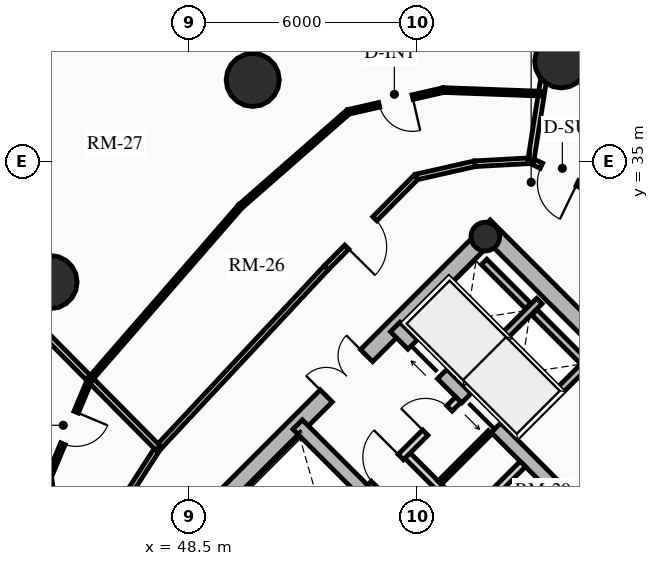
"""IFC4 building model, lengths in metres.
Left out: names, types, materials, properties, quantities, classifications, styles, units other than length and angle.
Written with IfcOpenShell. Run it as: python <this file> out.ifc"""

import sys

from ifc_helpers import new_model, si_unit, direction, frame, frame_2d, origin, origin_2d, place, context, subcontext, project, spatial, rectangle, circle, hollow_circle, extrude, source, transform, mapped, element, fill, save


model = new_model("IFC4")
c1 = context("Model", 3, precision=1e-05, world=origin(), true_north=direction((0.0, 1.0)))
c2 = subcontext(c1, "Body", "Model", "MODEL_VIEW")
j1 = project(units=[si_unit("LENGTHUNIT", "METRE"), si_unit("PLANEANGLEUNIT", "RADIAN")], contexts=[c1])
p1 = place(None, origin())
s1 = spatial("IfcSite", under=j1, at=p1, CompositionType="ELEMENT")
p2 = place(p1, origin())
s2 = spatial("IfcBuilding", under=s1, at=p2, CompositionType="ELEMENT")
p3 = place(p2, frame((0.0, 0.0, 93.43)))
s3 = spatial("IfcBuildingStorey", under=s2, at=p3, CompositionType="ELEMENT", Elevation=93.43)
p4 = place(p3, frame((66.303, 23.263, 0.0), z_axis=(0.0, 0.0, 1.0), x_axis=(-0.707106781187, 0.707106781187, 0.0)))
e1 = element("IfcWall", 1, at=p4, inside=s3, PredefinedType="SHEAR", context=c2, shape_type="SweptSolid", body=[
    extrude(rectangle(XDim=14.2, YDim=0.45, at=frame_2d((7.1, 0.0))), origin(), (0.0, 0.0, 1.0), 2.91),
])
p5 = place(p3, frame((48.856, 25.578, 0.0), z_axis=(0.0, 0.0, 1.0), x_axis=(0.707106781187, 0.707106781187, 0.0)))
e2 = element("IfcWall", 2, at=p5, inside=s3, PredefinedType="SHEAR", context=c2, shape_type="SweptSolid", body=[
    extrude(rectangle(XDim=10.7, YDim=0.45, at=frame_2d((5.35, 0.0))), origin(), (0.0, 0.0, 1.0), 2.91),
])
m1 = source(origin(), c2, "Body", "SweptSolid", [
    extrude(rectangle(XDim=1.5, YDim=2.02, at=frame_2d((0.75, 1.01))), frame((0.0, 0.235, 0.0), z_axis=(0.0, -1.0, 0.0), x_axis=(1.0, 0.0, 0.0)), (0.0, 0.0, 1.0), 0.47),
])
p6 = place(p5, frame((4.6, 0.0, 0.0)))
e3 = element("IfcOpeningElement", 3, at=p6, cuts=e2, PredefinedType="OPENING", context=c2, shape_type="MappedRepresentation", body=[
    mapped(m1, transform((0.0, 0.0, 0.0), x_axis=(1.0, 0.0, 0.0), y_axis=(0.0, 1.0, 0.0), z_axis=(0.0, 0.0, 1.0), scale=1.0)),
])
p7 = place(p3, frame((61.078, 18.355, 0.0), z_axis=(0.0, 0.0, 1.0), x_axis=(-0.707106781187, 0.707106781187, 0.0)))
e4 = element("IfcWall", 4, at=p7, inside=s3, PredefinedType="SHEAR", context=c2, shape_type="SweptSolid", body=[
    extrude(rectangle(XDim=13.75, YDim=0.35, at=frame_2d((6.875, 0.0))), origin(), (0.0, 0.0, 1.0), 2.91),
])
m2 = source(origin(), c2, "Body", "SweptSolid", [
    extrude(rectangle(XDim=1.1, YDim=2.015, at=frame_2d((0.55, 1.007))), frame((0.0, 0.185, 0.0), z_axis=(0.0, -1.0, 0.0), x_axis=(1.0, 0.0, 0.0)), (0.0, 0.0, 1.0), 0.37),
])
p8 = place(p7, frame((4.875, 0.0, 0.0)))
e5 = element("IfcOpeningElement", 5, at=p8, cuts=e4, PredefinedType="OPENING", context=c2, shape_type="MappedRepresentation", body=[
    mapped(m2, transform((0.0, 0.0, 0.0), x_axis=(1.0, 0.0, 0.0), y_axis=(0.0, 1.0, 0.0), z_axis=(0.0, 0.0, 1.0), scale=1.0)),
])
m3 = source(origin(), c2, "Body", "SweptSolid", [
    extrude(rectangle(XDim=1.15, YDim=2.02, at=frame_2d((0.575, 1.01))), frame((0.0, 0.185, 0.0), z_axis=(0.0, -1.0, 0.0), x_axis=(1.0, 0.0, 0.0)), (0.0, 0.0, 1.0), 0.37),
])
p9 = place(p7, frame((7.295, 0.0, 0.0)))
e6 = element("IfcOpeningElement", 6, at=p9, cuts=e4, PredefinedType="OPENING", context=c2, shape_type="MappedRepresentation", body=[
    mapped(m3, transform((0.0, 0.0, 0.0), x_axis=(1.0, 0.0, 0.0), y_axis=(0.0, 1.0, 0.0), z_axis=(0.0, 0.0, 1.0), scale=1.0)),
])
p10 = place(p3, frame((63.645, 20.922, 0.0), z_axis=(0.0, 0.0, 1.0), x_axis=(-0.707106781187, 0.707106781187, 0.0)))
e7 = element("IfcWall", 7, at=p10, inside=s3, PredefinedType="SHEAR", context=c2, shape_type="SweptSolid", body=[
    extrude(rectangle(XDim=13.75, YDim=0.35, at=frame_2d((6.875, 0.0))), origin(), (0.0, 0.0, 1.0), 2.91),
])
p11 = place(p10, frame((10.0, 0.0, 0.0)))
e8 = element("IfcOpeningElement", 8, at=p11, cuts=e7, PredefinedType="OPENING", context=c2, shape_type="MappedRepresentation", body=[
    mapped(m2, transform((0.0, 0.0, 0.0), x_axis=(1.0, 0.0, 0.0), y_axis=(0.0, 1.0, 0.0), z_axis=(0.0, 0.0, 1.0), scale=1.0)),
])
p12 = place(p10, frame((12.0, 0.0, 0.0)))
e9 = element("IfcOpeningElement", 9, at=p12, cuts=e7, PredefinedType="OPENING", context=c2, shape_type="MappedRepresentation", body=[
    mapped(m2, transform((0.0, 0.0, 0.0), x_axis=(1.0, 0.0, 0.0), y_axis=(0.0, 1.0, 0.0), z_axis=(0.0, 0.0, 1.0), scale=1.0)),
])
p13 = place(p10, frame((5.305, 0.0, 0.0)))
e10 = element("IfcOpeningElement", 10, at=p13, cuts=e7, PredefinedType="OPENING", context=c2, shape_type="MappedRepresentation", body=[
    mapped(m3, transform((0.0, 0.0, 0.0), x_axis=(1.0, 0.0, 0.0), y_axis=(0.0, 1.0, 0.0), z_axis=(0.0, 0.0, 1.0), scale=1.0)),
])
p14 = place(p3, frame((56.294, 33.024, 0.0), z_axis=(0.0, 0.0, 1.0), x_axis=(0.707106781187, 0.707106781187, 0.0)))
e11 = element("IfcColumn", 11, at=p14, inside=s3, PredefinedType="COLUMN", context=c2, shape_type="SweptSolid", body=[
    extrude(hollow_circle(Radius=0.38, WallThickness=0.032, at=origin_2d()), origin(), (0.0, 0.0, 1.0), 2.91),
])
for number, where, z_axis, x_axis in (
    (12, (58.291, 37.635, 0.0), (0.0, 0.0, 1.0), (1.0, 0.0, 0.0)),
    (13, (50.173, 37.146, 0.0), (0.0, 0.0, 1.0), (1.0, 0.0, 0.0)),
    (14, (44.854, 31.827, 0.0), (0.0, 0.0, 1.0), (1.0, 0.0, 0.0)),
):
    element("IfcColumn", number, at=place(p3, frame(where, z_axis=z_axis, x_axis=x_axis)), inside=s3, PredefinedType="USERDEFINED", context=c2, shape_type="SweptSolid", body=[
        extrude(circle(Radius=0.7, at=origin_2d()), origin(), (0.0, 0.0, 1.0), 2.91),
    ])
p15 = place(p3, frame((57.062, 27.781, 0.0), z_axis=(0.0, 0.0, 1.0), x_axis=(0.707106781187, 0.707106781187, 0.0)))
e15 = element("IfcWall", 15, at=p15, inside=s3, PredefinedType="SHEAR", context=c2, shape_type="SweptSolid", body=[
    extrude(rectangle(XDim=2.97, YDim=0.2, at=frame_2d((1.485, 0.0))), origin(), (0.0, 0.0, 1.0), 2.91),
])
p16 = place(p3, frame((55.615, 29.227, 0.0), z_axis=(0.0, 0.0, 1.0), x_axis=(0.707147878904, 0.70706568108, 0.0)))
e16 = element("IfcWall", 16, at=p16, inside=s3, PredefinedType="SHEAR", context=c2, shape_type="SweptSolid", body=[
    extrude(rectangle(XDim=2.97, YDim=0.2, at=frame_2d((1.485, 0.0))), origin(), (0.0, 0.0, 1.0), 2.91),
])
p17 = place(p3, frame((58.865, 29.754, 0.0), z_axis=(0.0, 0.0, 1.0), x_axis=(-0.707174411312, 0.707039144592, 0.0)))
e17 = element("IfcWall", 17, at=p17, inside=s3, PredefinedType="SHEAR", context=c2, shape_type="SweptSolid", body=[
    extrude(rectangle(XDim=1.805, YDim=0.2, at=frame_2d((0.902, 0.0))), origin(), (0.0, 0.0, 1.0), 2.91),
])
p18 = place(p3, frame((57.419, 31.2, 0.0), z_axis=(0.0, 0.0, 1.0), x_axis=(-0.707032117043, 0.707181437447, 0.0)))
e18 = element("IfcWall", 18, at=p18, inside=s3, PredefinedType="SHEAR", context=c2, shape_type="SweptSolid", body=[
    extrude(rectangle(XDim=1.635, YDim=0.2, at=frame_2d((0.817, 0.0))), origin(), (0.0, 0.0, 1.0), 2.91),
])
p19 = place(p3, frame((54.961, 24.719, 0.0), z_axis=(0.0, 0.0, 1.0), x_axis=(0.707106781187, 0.707106781187, 0.0)))
e19 = element("IfcWall", 19, at=p19, inside=s3, PredefinedType="PARTITIONING", context=c2, shape_type="SweptSolid", body=[
    extrude(rectangle(XDim=3.28, YDim=0.2, at=frame_2d((1.64, 0.0))), origin(), (0.0, 0.0, 1.0), 2.655),
])
m4 = source(origin(), c2, "Body", "SweptSolid", [
    extrude(rectangle(XDim=0.9, YDim=2.005, at=frame_2d((0.45, 1.002))), frame((0.0, 0.11, 0.0), z_axis=(0.0, -1.0, 0.0), x_axis=(1.0, 0.0, 0.0)), (0.0, 0.0, 1.0), 0.22),
])
p20 = place(p19, frame((0.16, 0.0, 0.0)))
e20 = element("IfcOpeningElement", 20, at=p20, cuts=e19, PredefinedType="OPENING", context=c2, shape_type="MappedRepresentation", body=[
    mapped(m4, transform((0.0, 0.0, 0.0), x_axis=(1.0, 0.0, 0.0), y_axis=(0.0, 1.0, 0.0), z_axis=(0.0, 0.0, 1.0), scale=1.0)),
])
p21 = place(p3, frame((55.874, 25.631, 0.0), z_axis=(0.0, 0.0, 1.0), x_axis=(-0.707157639372, 0.707055919343, 0.0)))
e21 = element("IfcWall", 21, at=p21, inside=s3, PredefinedType="PARTITIONING", context=c2, shape_type="SweptSolid", body=[
    extrude(rectangle(XDim=2.4, YDim=0.2, at=frame_2d((1.2, 0.0))), origin(), (0.0, 0.0, 1.0), 2.655),
])
p22 = place(p21, frame((0.14, 0.0, 0.0)))
e22 = element("IfcOpeningElement", 22, at=p22, cuts=e21, PredefinedType="OPENING", context=c2, shape_type="MappedRepresentation", body=[
    mapped(m4, transform((0.0, 0.0, 0.0), x_axis=(1.0, 0.0, 0.0), y_axis=(0.0, 1.0, 0.0), z_axis=(0.0, 0.0, 1.0), scale=1.0)),
])
p23 = place(p3, frame((53.264, 26.416, 0.0), z_axis=(0.0, 0.0, 1.0), x_axis=(0.707106781187, 0.707106781187, 0.0)))
e23 = element("IfcWall", 23, at=p23, inside=s3, PredefinedType="PARTITIONING", context=c2, shape_type="SweptSolid", body=[
    extrude(rectangle(XDim=3.28, YDim=0.2, at=frame_2d((1.64, 0.0))), origin(), (0.0, 0.0, 1.0), 2.655),
])
m5 = source(origin(), c2, "Body", "SweptSolid", [
    extrude(rectangle(XDim=1.0, YDim=2.015, at=frame_2d((0.5, 1.007))), frame((0.0, 0.11, 0.0), z_axis=(0.0, -1.0, 0.0), x_axis=(1.0, 0.0, 0.0)), (0.0, 0.0, 1.0), 0.22),
])
p24 = place(p23, frame((0.14, 0.0, 0.0)))
e24 = element("IfcOpeningElement", 24, at=p24, cuts=e23, PredefinedType="OPENING", context=c2, shape_type="MappedRepresentation", body=[
    mapped(m5, transform((0.0, 0.0, 0.0), x_axis=(1.0, 0.0, 0.0), y_axis=(0.0, 1.0, 0.0), z_axis=(0.0, 0.0, 1.0), scale=1.0)),
])
p25 = place(p23, frame((2.05, 0.0, 0.0)))
e25 = element("IfcOpeningElement", 25, at=p25, cuts=e23, PredefinedType="OPENING", context=c2, shape_type="MappedRepresentation", body=[
    mapped(m4, transform((0.0, 0.0, 0.0), x_axis=(1.0, 0.0, 0.0), y_axis=(0.0, 1.0, 0.0), z_axis=(0.0, 0.0, 1.0), scale=1.0)),
])
p26 = place(p3, frame((55.089, 26.543, 0.0), z_axis=(0.0, 0.0, 1.0), x_axis=(0.707106781187, 0.707106781187, 0.0)))
e26 = element("IfcWall", 26, at=p26, inside=s3, PredefinedType="PARTITIONING", context=c2, shape_type="SweptSolid", body=[
    extrude(rectangle(XDim=1.88, YDim=0.125, at=frame_2d((0.94, 0.0))), origin(), (0.0, 0.0, 1.0), 2.655),
])
p27 = place(p3, frame((58.823, 34.378, 0.0), z_axis=(0.0, 0.0, 1.0), x_axis=(-0.900449137666, 0.434961320668, 0.0)))
e27 = element("IfcWall", 27, at=p27, inside=s3, PredefinedType="PARTITIONING", context=c2, shape_type="SweptSolid", body=[
    extrude(rectangle(XDim=1.479, YDim=0.15, at=frame_2d((0.74, 0.0))), origin(), (0.0, 0.0, 1.0), 2.225),
])
m6 = source(origin(), c2, "Body", "SweptSolid", [
    extrude(rectangle(XDim=1.05, YDim=2.015, at=frame_2d((0.525, 1.007))), frame((0.0, 0.085, 0.0), z_axis=(0.0, -1.0, 0.0), x_axis=(1.0, 0.0, 0.0)), (0.0, 0.0, 1.0), 0.17),
])
p28 = place(p27, frame((0.12, 0.0, 0.0)))
e28 = element("IfcOpeningElement", 28, at=p28, cuts=e27, PredefinedType="OPENING", context=c2, shape_type="MappedRepresentation", body=[
    mapped(m6, transform((0.0, 0.0, 0.0), x_axis=(1.0, 0.0, 0.0), y_axis=(0.0, 1.0, 0.0), z_axis=(0.0, 0.0, 1.0), scale=1.0)),
])
p29 = place(p3, frame((57.491, 35.021, 0.0), z_axis=(0.0, 0.0, 1.0), x_axis=(-0.9985194771, -0.054395347698, 0.0)))
e29 = element("IfcWall", 29, at=p29, inside=s3, PredefinedType="PARTITIONING", context=c2, shape_type="SweptSolid", body=[
    extrude(rectangle(XDim=1.472, YDim=0.15, at=frame_2d((0.736, 0.0))), origin(), (0.0, 0.0, 1.0), 2.225),
])
p30 = place(p3, frame((56.021, 34.941, 0.0), z_axis=(0.0, 0.0, 1.0), x_axis=(-0.975309543901, -0.220842236847, 0.0)))
e30 = element("IfcWall", 30, at=p30, inside=s3, PredefinedType="PARTITIONING", context=c2, shape_type="SweptSolid", body=[
    extrude(rectangle(XDim=1.585, YDim=0.15, at=frame_2d((0.792, 0.0))), origin(), (0.0, 0.0, 1.0), 2.225),
])
p31 = place(p3, frame((54.475, 34.591, 0.0), z_axis=(0.0, 0.0, 1.0), x_axis=(-0.703869646439, -0.710329163714, 0.0)))
e31 = element("IfcWall", 31, at=p31, inside=s3, PredefinedType="PARTITIONING", context=c2, shape_type="SweptSolid", body=[
    extrude(rectangle(XDim=3.364, YDim=0.15, at=frame_2d((1.682, 0.0))), origin(), (0.0, 0.0, 1.0), 2.225),
])
p32 = place(p31, frame((1.546, 0.0, 0.0)))
e32 = element("IfcOpeningElement", 32, at=p32, cuts=e31, PredefinedType="OPENING", context=c2, shape_type="MappedRepresentation", body=[
    mapped(m6, transform((0.0, 0.0, 0.0), x_axis=(1.0, 0.0, 0.0), y_axis=(0.0, 1.0, 0.0), z_axis=(0.0, 0.0, 1.0), scale=1.0)),
])
p33 = place(p3, frame((52.107, 32.202, 0.0), z_axis=(0.0, 0.0, 1.0), x_axis=(-0.682605209028, -0.730787334734, 0.0)))
e33 = element("IfcWall", 33, at=p33, inside=s3, PredefinedType="PARTITIONING", context=c2, shape_type="SweptSolid", body=[
    extrude(rectangle(XDim=6.486, YDim=0.15, at=frame_2d((3.243, 0.0))), origin(), (0.0, 0.0, 1.0), 2.225),
])
p34 = place(p3, frame((47.68, 27.462, 0.0), z_axis=(0.0, 0.0, 1.0), x_axis=(-0.542097952486, -0.840315303865, 0.0)))
e34 = element("IfcWall", 34, at=p34, inside=s3, PredefinedType="PARTITIONING", context=c2, shape_type="SweptSolid", body=[
    extrude(rectangle(XDim=1.923, YDim=0.15, at=frame_2d((0.961, 0.0))), origin(), (0.0, 0.0, 1.0), 2.225),
])
p35 = place(p3, frame((57.491, 35.021, 0.0), z_axis=(0.0, 0.0, 1.0), x_axis=(0.155805268746, 0.98778779008, 0.0)))
e35 = element("IfcWall", 35, at=p35, inside=s3, PredefinedType="PARTITIONING", context=c2, shape_type="SweptSolid", body=[
    extrude(rectangle(XDim=6.376, YDim=0.16, at=frame_2d((3.188, 0.0))), origin(), (0.0, 0.0, 1.0), 2.179),
])
p36 = place(p3, frame((47.68, 27.462, 0.0), z_axis=(0.0, 0.0, 1.0), x_axis=(-0.703913074907, 0.710286127539, 0.0)))
e36 = element("IfcWall", 36, at=p36, inside=s3, PredefinedType="PARTITIONING", context=c2, shape_type="SweptSolid", body=[
    extrude(rectangle(XDim=9.079, YDim=0.16, at=frame_2d((4.54, 0.0))), origin(), (0.0, 0.0, 1.0), 2.179),
])
p37 = place(p3, frame((57.769, 36.785, 0.0), z_axis=(0.0, 0.0, 1.0), x_axis=(-0.999316779648, 0.036959084311, 0.0)))
e37 = element("IfcWall", 37, at=p37, inside=s3, PredefinedType="PARTITIONING", context=c2, shape_type="SweptSolid", body=[
    extrude(rectangle(XDim=2.576, YDim=0.125, at=frame_2d((1.288, 0.0))), origin(), (0.0, 0.0, 1.0), 2.655),
])
p38 = place(p3, frame((55.194, 36.88, 0.0), z_axis=(0.0, 0.0, 1.0), x_axis=(-0.97469098149, -0.22355645954, 0.0)))
e38 = element("IfcWall", 38, at=p38, inside=s3, PredefinedType="PARTITIONING", context=c2, shape_type="SweptSolid", body=[
    extrude(rectangle(XDim=2.573, YDim=0.125, at=frame_2d((1.287, 0.0))), origin(), (0.0, 0.0, 1.0), 2.225),
])
m7 = source(origin(), c2, "Body", "SweptSolid", [
    extrude(rectangle(XDim=0.9, YDim=2.005, at=frame_2d((0.45, 1.002))), frame((0.0, 0.073, 0.0), z_axis=(0.0, -1.0, 0.0), x_axis=(1.0, 0.0, 0.0)), (0.0, 0.0, 1.0), 0.145),
])
p39 = place(p38, frame((0.836, 0.0, 0.0)))
e39 = element("IfcOpeningElement", 39, at=p39, cuts=e38, PredefinedType="OPENING", context=c2, shape_type="MappedRepresentation", body=[
    mapped(m7, transform((0.0, 0.0, 0.0), x_axis=(1.0, 0.0, 0.0), y_axis=(0.0, 1.0, 0.0), z_axis=(0.0, 0.0, 1.0), scale=1.0)),
])
p40 = place(p3, frame((52.687, 36.305, 0.0), z_axis=(0.0, 0.0, 1.0), x_axis=(-0.752332345919, -0.658783759123, 0.0)))
e40 = element("IfcWall", 40, at=p40, inside=s3, PredefinedType="PARTITIONING", context=c2, shape_type="SweptSolid", body=[
    extrude(rectangle(XDim=3.776, YDim=0.125, at=frame_2d((1.888, 0.0))), origin(), (0.0, 0.0, 1.0), 2.225),
])
p41 = place(p3, frame((49.845, 33.817, 0.0), z_axis=(0.0, 0.0, 1.0), x_axis=(-0.656101508867, -0.754672650931, 0.0)))
e41 = element("IfcWall", 41, at=p41, inside=s3, PredefinedType="PARTITIONING", context=c2, shape_type="SweptSolid", body=[
    extrude(rectangle(XDim=6.029, YDim=0.125, at=frame_2d((3.014, 0.0))), origin(), (0.0, 0.0, 1.0), 2.225),
])
p42 = place(p3, frame((45.89, 29.268, 0.0), z_axis=(0.0, 0.0, 1.0), x_axis=(-0.387057419757, -0.922055613188, 0.0)))
e42 = element("IfcWall", 42, at=p42, inside=s3, PredefinedType="PARTITIONING", context=c2, shape_type="SweptSolid", body=[
    extrude(rectangle(XDim=2.774, YDim=0.125, at=frame_2d((1.387, 0.0))), origin(), (0.0, 0.0, 1.0), 2.225),
])
p43 = place(p42, frame((0.937, 0.0, 0.0)))
e43 = element("IfcOpeningElement", 43, at=p43, cuts=e42, PredefinedType="OPENING", context=c2, shape_type="MappedRepresentation", body=[
    mapped(m7, transform((0.0, 0.0, 0.0), x_axis=(1.0, 0.0, 0.0), y_axis=(0.0, 1.0, 0.0), z_axis=(0.0, 0.0, 1.0), scale=1.0)),
])
p44 = place(p3, frame((44.816, 26.71, 0.0), z_axis=(0.0, 0.0, 1.0), x_axis=(0.131724981355, -0.991286300363, 0.0)))
e44 = element("IfcWall", 44, at=p44, inside=s3, PredefinedType="PARTITIONING", context=c2, shape_type="SweptSolid", body=[
    extrude(rectangle(XDim=2.515, YDim=0.125, at=frame_2d((1.258, 0.0))), origin(), (0.0, 0.0, 1.0), 2.655),
])
m8 = source(origin(), c2, "Body", "SweptSolid", [
    extrude(rectangle(XDim=1.1, YDim=2.015, at=frame_2d((0.55, 1.007))), frame((0.0, 0.025, 0.0), z_axis=(0.0, -1.0, 0.0), x_axis=(1.0, 0.0, 0.0)), (0.0, 0.0, 1.0), 0.05),
])
p45 = place(p11, origin())
e45 = element("IfcDoor", 45, at=p45, inside=s3, OperationType="SLIDING_TO_LEFT", PredefinedType="DOOR", context=c2, shape_type="MappedRepresentation", body=[
    mapped(m8, transform((0.0, 0.0, 0.0), x_axis=(1.0, 0.0, 0.0), y_axis=(0.0, 1.0, 0.0), z_axis=(0.0, 0.0, 1.0), scale=1.0)),
])
fill(e8, e45)
p46 = place(p12, origin())
e46 = element("IfcDoor", 46, at=p46, inside=s3, OperationType="SLIDING_TO_RIGHT", PredefinedType="DOOR", context=c2, shape_type="MappedRepresentation", body=[
    mapped(m8, transform((0.0, 0.0, 0.0), x_axis=(1.0, 0.0, 0.0), y_axis=(0.0, 1.0, 0.0), z_axis=(0.0, 0.0, 1.0), scale=1.0)),
])
fill(e9, e46)
m9 = source(origin(), c2, "Body", "SweptSolid", [
    extrude(rectangle(XDim=1.5, YDim=2.02, at=frame_2d((0.75, 1.01))), frame((0.0, 0.025, 0.0), z_axis=(0.0, -1.0, 0.0), x_axis=(1.0, 0.0, 0.0)), (0.0, 0.0, 1.0), 0.05),
])
p47 = place(p6, origin())
e47 = element("IfcDoor", 47, at=p47, inside=s3, OperationType="DOUBLE_DOOR_SINGLE_SWING", PredefinedType="DOOR", context=c2, shape_type="MappedRepresentation", body=[
    mapped(m9, transform((0.0, 0.0, 0.0), x_axis=(1.0, 0.0, 0.0), y_axis=(0.0, 1.0, 0.0), z_axis=(0.0, 0.0, 1.0), scale=1.0)),
])
fill(e3, e47)
m10 = source(origin(), c2, "Body", "SweptSolid", [
    extrude(rectangle(XDim=1.0, YDim=2.015, at=frame_2d((0.5, 1.007))), frame((0.0, 0.025, 0.0), z_axis=(0.0, -1.0, 0.0), x_axis=(1.0, 0.0, 0.0)), (0.0, 0.0, 1.0), 0.05),
])
p48 = place(p24, origin())
e48 = element("IfcDoor", 48, at=p48, inside=s3, OperationType="SINGLE_SWING_RIGHT", PredefinedType="DOOR", context=c2, shape_type="MappedRepresentation", body=[
    mapped(m10, transform((0.0, 0.0, 0.0), x_axis=(1.0, 0.0, 0.0), y_axis=(0.0, 1.0, 0.0), z_axis=(0.0, 0.0, 1.0), scale=1.0)),
])
fill(e24, e48)
m11 = source(origin(), c2, "Body", "SweptSolid", [
    extrude(rectangle(XDim=0.9, YDim=2.005, at=frame_2d((0.45, 1.002))), frame((0.0, 0.025, 0.0), z_axis=(0.0, -1.0, 0.0), x_axis=(1.0, 0.0, 0.0)), (0.0, 0.0, 1.0), 0.05),
])
p49 = place(p25, origin())
e49 = element("IfcDoor", 49, at=p49, inside=s3, OperationType="SINGLE_SWING_LEFT", PredefinedType="DOOR", context=c2, shape_type="MappedRepresentation", body=[
    mapped(m11, transform((0.0, 0.0, 0.0), x_axis=(1.0, 0.0, 0.0), y_axis=(0.0, 1.0, 0.0), z_axis=(0.0, 0.0, 1.0), scale=1.0)),
])
fill(e25, e49)
m12 = source(origin(), c2, "Body", "SweptSolid", [
    extrude(rectangle(XDim=1.05, YDim=2.015, at=frame_2d((0.525, 1.007))), frame((0.0, 0.025, 0.0), z_axis=(0.0, -1.0, 0.0), x_axis=(1.0, 0.0, 0.0)), (0.0, 0.0, 1.0), 0.05),
])
p50 = place(p32, origin())
e50 = element("IfcDoor", 50, at=p50, inside=s3, OperationType="SINGLE_SWING_RIGHT", PredefinedType="DOOR", context=c2, shape_type="MappedRepresentation", body=[
    mapped(m12, transform((0.0, 0.0, 0.0), x_axis=(1.0, 0.0, 0.0), y_axis=(0.0, 1.0, 0.0), z_axis=(0.0, 0.0, 1.0), scale=1.0)),
])
fill(e32, e50)
p51 = place(p39, origin())
e51 = element("IfcDoor", 51, at=p51, inside=s3, OperationType="SINGLE_SWING_LEFT", PredefinedType="DOOR", context=c2, shape_type="MappedRepresentation", body=[
    mapped(m11, transform((0.0, 0.0, 0.0), x_axis=(1.0, 0.0, 0.0), y_axis=(0.0, 1.0, 0.0), z_axis=(0.0, 0.0, 1.0), scale=1.0)),
])
fill(e39, e51)
p52 = place(p43, origin())
e52 = element("IfcDoor", 52, at=p52, inside=s3, OperationType="SINGLE_SWING_LEFT", PredefinedType="DOOR", context=c2, shape_type="MappedRepresentation", body=[
    mapped(m11, transform((0.0, 0.0, 0.0), x_axis=(1.0, 0.0, 0.0), y_axis=(0.0, 1.0, 0.0), z_axis=(0.0, 0.0, 1.0), scale=1.0)),
])
fill(e43, e52)
p53 = place(p28, origin())
e53 = element("IfcDoor", 53, at=p53, inside=s3, OperationType="SINGLE_SWING_LEFT", PredefinedType="DOOR", context=c2, shape_type="MappedRepresentation", body=[
    mapped(m12, transform((0.0, 0.0, 0.0), x_axis=(1.0, 0.0, 0.0), y_axis=(0.0, 1.0, 0.0), z_axis=(0.0, 0.0, 1.0), scale=1.0)),
])
fill(e28, e53)
save(model, sys.argv[1])
